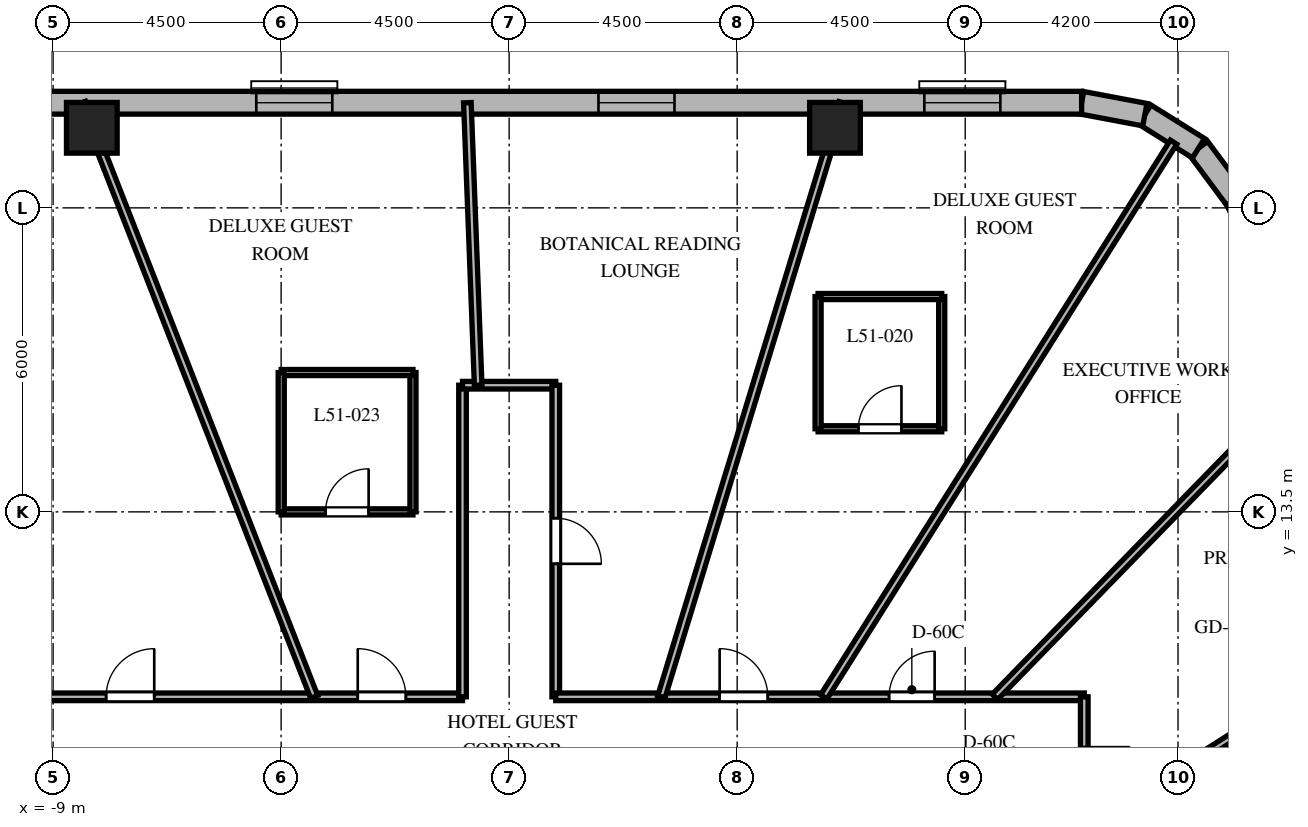
"""IFC4 building model, lengths in metres.
Left out: names, types, materials, properties, quantities, classifications, styles, units other than length and angle.
Written with IfcOpenShell. Run it as: python <this file> out.ifc"""

import sys

from ifc_helpers import new_model, si_unit, direction, frame, frame_2d, origin, origin_2d, place, context, subcontext, project, spatial, rectangle, extrude, element, fill, save


model = new_model("IFC4")
c1 = context("Model", 3, precision=1e-05, world=origin(), true_north=direction((0.0, 1.0)))
c2 = subcontext(c1, "Body", "Model", "MODEL_VIEW")
j1 = project(units=[si_unit("LENGTHUNIT", "METRE"), si_unit("PLANEANGLEUNIT", "RADIAN")], contexts=[c1])
p1 = place(None, origin())
s1 = spatial("IfcSite", under=j1, at=p1, CompositionType="ELEMENT")
p2 = place(p1, origin())
s2 = spatial("IfcBuilding", under=s1, at=p2, CompositionType="ELEMENT")
p3 = place(p2, frame((0.0, 0.0, 206.5)))
s3 = spatial("IfcBuildingStorey", under=s2, at=p3, CompositionType="ELEMENT", Elevation=206.5)
for number, where, z_axis, x_axis in (
    (1, (6.43, 21.08, 0.0), (0.0, 0.0, 1.0), (1.0, 0.0, 0.0)),
    (2, (-8.236, 21.08, 0.0), (0.0, 0.0, 1.0), (1.0, 0.0, 0.0)),
):
    element("IfcColumn", number, at=place(p3, frame(where, z_axis=z_axis, x_axis=x_axis)), inside=s3, PredefinedType="COLUMN", context=c2, shape_type="SweptSolid", body=[
        extrude(rectangle(XDim=1.0, YDim=1.0, at=origin_2d()), origin(), (0.0, 0.0, 1.0), 3.8),
    ])
p4 = place(p3, frame((14.362, 19.658, 0.0), z_axis=(0.0, 0.0, 1.0), x_axis=(-0.596642462792, 0.80250717853, 0.0)))
e3 = element("IfcWall", 3, at=p4, inside=s3, PredefinedType="SOLIDWALL", context=c2, shape_type="SweptSolid", body=[
    extrude(rectangle(XDim=1.27, YDim=0.45, at=frame_2d((0.635, 0.0))), origin(), (0.0, 0.0, 1.0), 3.5),
])
p5 = place(p3, frame((13.604, 20.678, 0.0), z_axis=(0.0, 0.0, 1.0), x_axis=(-0.847910404124, 0.53013955387, 0.0)))
e4 = element("IfcWall", 4, at=p5, inside=s3, PredefinedType="SOLIDWALL", context=c2, shape_type="SweptSolid", body=[
    extrude(rectangle(XDim=1.249, YDim=0.45, at=frame_2d((0.624, 0.0))), origin(), (0.0, 0.0, 1.0), 3.5),
])
p6 = place(p3, frame((12.546, 21.34, 0.0), z_axis=(0.0, 0.0, 1.0), x_axis=(-0.982686750835, 0.18527479519, 0.0)))
e5 = element("IfcWall", 5, at=p6, inside=s3, PredefinedType="SOLIDWALL", context=c2, shape_type="SweptSolid", body=[
    extrude(rectangle(XDim=1.27, YDim=0.45, at=frame_2d((0.635, 0.0))), origin(), (0.0, 0.0, 1.0), 3.5),
])
p7 = place(p3, frame((22.74, 2.452, 0.0), z_axis=(0.0, 0.0, 1.0), x_axis=(-0.437753424814, 0.899095066755, 0.0)))
e6 = element("IfcWall", 6, at=p7, inside=s3, PredefinedType="SOLIDWALL", context=c2, shape_type="SweptSolid", body=[
    extrude(rectangle(XDim=19.137, YDim=0.45, at=frame_2d((9.569, 0.0))), origin(), (0.0, 0.0, 1.0), 3.5),
])
p8 = place(p7, frame((4.763, 0.0, 0.0)))
e7 = element("IfcOpeningElement", 7, at=p8, cuts=e6, PredefinedType="OPENING", context=c2, shape_type="SweptSolid", body=[
    extrude(rectangle(XDim=1.0, YDim=2.15, at=frame_2d((0.5, 1.075))), frame((0.0, 0.235, 0.0), z_axis=(0.0, -1.0, 0.0), x_axis=(1.0, 0.0, 0.0)), (0.0, 0.0, 1.0), 0.47),
])
p9 = place(p7, frame((0.916, 0.0, 0.8)))
e8 = element("IfcOpeningElement", 8, at=p9, cuts=e6, PredefinedType="OPENING", context=c2, shape_type="SweptSolid", body=[
    extrude(rectangle(XDim=2.1, YDim=1.85, at=frame_2d((1.05, 0.925))), frame((0.0, 0.235, 0.0), z_axis=(0.0, -1.0, 0.0), x_axis=(1.0, 0.0, 0.0)), (0.0, 0.0, 1.0), 0.47),
])
p10 = place(p7, frame((6.851, 0.0, 0.8)))
e9 = element("IfcOpeningElement", 9, at=p10, cuts=e6, PredefinedType="OPENING", context=c2, shape_type="SweptSolid", body=[
    extrude(rectangle(XDim=2.1, YDim=1.85, at=frame_2d((1.05, 0.925))), frame((0.0, 0.235, 0.0), z_axis=(0.0, -1.0, 0.0), x_axis=(1.0, 0.0, 0.0)), (0.0, 0.0, 1.0), 0.47),
])
p11 = place(p7, frame((11.545, 0.0, 0.8)))
e10 = element("IfcOpeningElement", 10, at=p11, cuts=e6, PredefinedType="OPENING", context=c2, shape_type="SweptSolid", body=[
    extrude(rectangle(XDim=2.1, YDim=1.85, at=frame_2d((1.05, 0.925))), frame((0.0, 0.235, 0.0), z_axis=(0.0, -1.0, 0.0), x_axis=(1.0, 0.0, 0.0)), (0.0, 0.0, 1.0), 0.47),
])
p12 = place(p7, frame((16.173, 0.0, 0.8)))
e11 = element("IfcOpeningElement", 11, at=p12, cuts=e6, PredefinedType="OPENING", context=c2, shape_type="SweptSolid", body=[
    extrude(rectangle(XDim=2.1, YDim=1.85, at=frame_2d((1.05, 0.925))), frame((0.0, 0.235, 0.0), z_axis=(0.0, -1.0, 0.0), x_axis=(1.0, 0.0, 0.0)), (0.0, 0.0, 1.0), 0.47),
])
p13 = place(p3, frame((11.298, 21.575, 0.0), z_axis=(0.0, 0.0, 1.0), x_axis=(-1.0, 0.0, 0.0)))
e12 = element("IfcWall", 12, at=p13, inside=s3, PredefinedType="SOLIDWALL", context=c2, shape_type="SweptSolid", body=[
    extrude(rectangle(XDim=24.399, YDim=0.45, at=frame_2d((12.2, 0.0))), origin(), (0.0, 0.0, 1.0), 3.5),
])
p14 = place(p13, frame((1.604, 0.0, 0.8)))
e13 = element("IfcOpeningElement", 13, at=p14, cuts=e12, PredefinedType="OPENING", context=c2, shape_type="SweptSolid", body=[
    extrude(rectangle(XDim=1.5, YDim=1.8, at=frame_2d((0.75, 0.9))), frame((0.0, 0.235, 0.0), z_axis=(0.0, -1.0, 0.0), x_axis=(1.0, 0.0, 0.0)), (0.0, 0.0, 1.0), 0.47),
])
p15 = place(p13, frame((8.035, 0.0, 0.8)))
e14 = element("IfcOpeningElement", 14, at=p15, cuts=e12, PredefinedType="OPENING", context=c2, shape_type="SweptSolid", body=[
    extrude(rectangle(XDim=1.5, YDim=1.8, at=frame_2d((0.75, 0.9))), frame((0.0, 0.235, 0.0), z_axis=(0.0, -1.0, 0.0), x_axis=(1.0, 0.0, 0.0)), (0.0, 0.0, 1.0), 0.47),
])
p16 = place(p13, frame((14.788, 0.0, 0.8)))
e15 = element("IfcOpeningElement", 15, at=p16, cuts=e12, PredefinedType="OPENING", context=c2, shape_type="SweptSolid", body=[
    extrude(rectangle(XDim=1.5, YDim=1.8, at=frame_2d((0.75, 0.9))), frame((0.0, 0.235, 0.0), z_axis=(0.0, -1.0, 0.0), x_axis=(1.0, 0.0, 0.0)), (0.0, 0.0, 1.0), 0.47),
])
p17 = place(p13, frame((21.296, 0.0, 0.8)))
e16 = element("IfcOpeningElement", 16, at=p17, cuts=e12, PredefinedType="OPENING", context=c2, shape_type="SweptSolid", body=[
    extrude(rectangle(XDim=1.5, YDim=1.8, at=frame_2d((0.75, 0.9))), frame((0.0, 0.235, 0.0), z_axis=(0.0, -1.0, 0.0), x_axis=(1.0, 0.0, 0.0)), (0.0, 0.0, 1.0), 0.47),
])
p18 = place(p3, frame((-11.35, 9.85, 0.0), z_axis=(0.0, 0.0, 1.0), x_axis=(1.0, 0.0, 0.0)))
e17 = element("IfcWall", 17, at=p18, inside=s3, PredefinedType="PARTITIONING", context=c2, shape_type="SweptSolid", body=[
    extrude(rectangle(XDim=10.43, YDim=0.15, at=frame_2d((5.215, 0.0))), origin(), (0.0, 0.0, 1.0), 2.99),
])
p19 = place(p18, frame((8.362, 0.0, 0.0)))
e18 = element("IfcOpeningElement", 18, at=p19, cuts=e17, PredefinedType="OPENING", context=c2, shape_type="SweptSolid", body=[
    extrude(rectangle(XDim=0.95, YDim=2.03, at=frame_2d((0.475, 1.015))), frame((0.0, 0.085, 0.0), z_axis=(0.0, -1.0, 0.0), x_axis=(1.0, 0.0, 0.0)), (0.0, 0.0, 1.0), 0.17),
])
p20 = place(p18, frame((3.396, 0.0, 0.0)))
e19 = element("IfcOpeningElement", 19, at=p20, cuts=e17, PredefinedType="OPENING", context=c2, shape_type="SweptSolid", body=[
    extrude(rectangle(XDim=0.95, YDim=2.03, at=frame_2d((0.475, 1.015))), frame((0.0, 0.085, 0.0), z_axis=(0.0, -1.0, 0.0), x_axis=(1.0, 0.0, 0.0)), (0.0, 0.0, 1.0), 0.17),
])
p21 = place(p3, frame((-0.92, 9.85, 0.0), z_axis=(0.0, 0.0, 1.0), x_axis=(0.0, 1.0, 0.0)))
e20 = element("IfcWall", 20, at=p21, inside=s3, PredefinedType="PARTITIONING", context=c2, shape_type="SweptSolid", body=[
    extrude(rectangle(XDim=6.15, YDim=0.15, at=frame_2d((3.075, 0.0))), origin(), (0.0, 0.0, 1.0), 3.027),
])
p22 = place(p3, frame((-0.92, 16.0, 0.0), z_axis=(0.0, 0.0, 1.0), x_axis=(1.0, 0.0, 0.0)))
e21 = element("IfcWall", 21, at=p22, inside=s3, PredefinedType="PARTITIONING", context=c2, shape_type="SweptSolid", body=[
    extrude(rectangle(XDim=1.84, YDim=0.15, at=frame_2d((0.92, 0.0))), origin(), (0.0, 0.0, 1.0), 3.5),
])
p23 = place(p3, frame((0.92, 16.0, 0.0), z_axis=(0.0, 0.0, 1.0), x_axis=(0.0, -1.0, 0.0)))
e22 = element("IfcWall", 22, at=p23, inside=s3, PredefinedType="PARTITIONING", context=c2, shape_type="SweptSolid", body=[
    extrude(rectangle(XDim=6.15, YDim=0.15, at=frame_2d((3.075, 0.0))), origin(), (0.0, 0.0, 1.0), 3.027),
])
p24 = place(p23, frame((2.625, 0.0, 0.0)))
e23 = element("IfcOpeningElement", 23, at=p24, cuts=e22, PredefinedType="OPENING", context=c2, shape_type="SweptSolid", body=[
    extrude(rectangle(XDim=0.9, YDim=2.03, at=frame_2d((0.45, 1.015))), frame((0.0, 0.085, 0.0), z_axis=(0.0, -1.0, 0.0), x_axis=(1.0, 0.0, 0.0)), (0.0, 0.0, 1.0), 0.17),
])
p25 = place(p3, frame((0.92, 9.85, 0.0), z_axis=(0.0, 0.0, 1.0), x_axis=(1.0, 0.0, 0.0)))
e24 = element("IfcWall", 24, at=p25, inside=s3, PredefinedType="PARTITIONING", context=c2, shape_type="SweptSolid", body=[
    extrude(rectangle(XDim=10.43, YDim=0.15, at=frame_2d((5.215, 0.0))), origin(), (0.0, 0.0, 1.0), 2.99),
])
p26 = place(p25, frame((6.577, 0.0, 0.0)))
e25 = element("IfcOpeningElement", 25, at=p26, cuts=e24, PredefinedType="OPENING", context=c2, shape_type="SweptSolid", body=[
    extrude(rectangle(XDim=0.9, YDim=2.03, at=frame_2d((0.45, 1.015))), frame((0.0, 0.085, 0.0), z_axis=(0.0, -1.0, 0.0), x_axis=(1.0, 0.0, 0.0)), (0.0, 0.0, 1.0), 0.17),
])
p27 = place(p25, frame((3.234, 0.0, 0.0)))
e26 = element("IfcOpeningElement", 26, at=p27, cuts=e24, PredefinedType="OPENING", context=c2, shape_type="SweptSolid", body=[
    extrude(rectangle(XDim=0.95, YDim=2.03, at=frame_2d((0.475, 1.015))), frame((0.0, 0.085, 0.0), z_axis=(0.0, -1.0, 0.0), x_axis=(1.0, 0.0, 0.0)), (0.0, 0.0, 1.0), 0.17),
])
p28 = place(p3, frame((11.35, 9.85, 0.0), z_axis=(0.0, 0.0, 1.0), x_axis=(0.0, -1.0, 0.0)))
e27 = element("IfcWall", 27, at=p28, inside=s3, PredefinedType="PARTITIONING", context=c2, shape_type="SweptSolid", body=[
    extrude(rectangle(XDim=12.4, YDim=0.15, at=frame_2d((6.2, 0.0))), origin(), (0.0, 0.0, 1.0), 2.99),
])
p29 = place(p28, frame((7.555, 0.0, 0.0)))
e28 = element("IfcOpeningElement", 28, at=p29, cuts=e27, PredefinedType="OPENING", context=c2, shape_type="SweptSolid", body=[
    extrude(rectangle(XDim=0.95, YDim=2.03, at=frame_2d((0.475, 1.015))), frame((0.0, 0.085, 0.0), z_axis=(0.0, -1.0, 0.0), x_axis=(1.0, 0.0, 0.0)), (0.0, 0.0, 1.0), 0.17),
])
p30 = place(p28, frame((4.191, 0.0, 0.0)))
e29 = element("IfcOpeningElement", 29, at=p30, cuts=e27, PredefinedType="OPENING", context=c2, shape_type="SweptSolid", body=[
    extrude(rectangle(XDim=0.95, YDim=2.03, at=frame_2d((0.475, 1.015))), frame((0.0, 0.085, 0.0), z_axis=(0.0, -1.0, 0.0), x_axis=(1.0, 0.0, 0.0)), (0.0, 0.0, 1.0), 0.17),
])
p31 = place(p28, frame((0.994, 0.0, 0.0)))
e30 = element("IfcOpeningElement", 30, at=p31, cuts=e27, PredefinedType="OPENING", context=c2, shape_type="SweptSolid", body=[
    extrude(rectangle(XDim=0.9, YDim=2.03, at=frame_2d((0.45, 1.015))), frame((0.0, 0.085, 0.0), z_axis=(0.0, -1.0, 0.0), x_axis=(1.0, 0.0, 0.0)), (0.0, 0.0, 1.0), 0.17),
])
p32 = place(p28, frame((10.144, 0.0, 0.0)))
e31 = element("IfcOpeningElement", 31, at=p32, cuts=e27, PredefinedType="OPENING", context=c2, shape_type="SweptSolid", body=[
    extrude(rectangle(XDim=0.95, YDim=2.03, at=frame_2d((0.475, 1.015))), frame((0.0, 0.085, 0.0), z_axis=(0.0, -1.0, 0.0), x_axis=(1.0, 0.0, 0.0)), (0.0, 0.0, 1.0), 0.17),
])
p33 = place(p3, frame((11.35, 7.202, 0.0), z_axis=(0.0, 0.0, 1.0), x_axis=(0.844364592263, 0.535769013039, 0.0)))
e32 = element("IfcWall", 32, at=p33, inside=s3, PredefinedType="PARTITIONING", context=c2, shape_type="SweptSolid", body=[
    extrude(rectangle(XDim=8.213, YDim=0.15, at=frame_2d((4.106, 0.0))), origin(), (0.0, 0.0, 1.0), 2.74),
])
p34 = place(p3, frame((9.588, 9.85, 0.0), z_axis=(0.0, 0.0, 1.0), x_axis=(0.697519469595, 0.716565830567, 0.0)))
e33 = element("IfcWall", 33, at=p34, inside=s3, PredefinedType="PARTITIONING", context=c2, shape_type="SweptSolid", body=[
    extrude(rectangle(XDim=9.126, YDim=0.15, at=frame_2d((4.563, 0.0))), origin(), (0.0, 0.0, 1.0), 2.74),
])
p35 = place(p3, frame((6.21, 9.85, 0.0), z_axis=(0.0, 0.0, 1.0), x_axis=(0.533335553786, 0.84590376939, 0.0)))
e34 = element("IfcWall", 34, at=p35, inside=s3, PredefinedType="PARTITIONING", context=c2, shape_type="SweptSolid", body=[
    extrude(rectangle(XDim=12.941, YDim=0.15, at=frame_2d((6.47, 0.0))), origin(), (0.0, 0.0, 1.0), 2.74),
])
p36 = place(p3, frame((3.004, 9.85, 0.0), z_axis=(0.0, 0.0, 1.0), x_axis=(0.291775760688, 0.956486751333, 0.0)))
e35 = element("IfcWall", 35, at=p36, inside=s3, PredefinedType="PARTITIONING", context=c2, shape_type="SweptSolid", body=[
    extrude(rectangle(XDim=12.258, YDim=0.15, at=frame_2d((6.129, 0.0))), origin(), (0.0, 0.0, 1.0), 2.74),
])
p37 = place(p3, frame((-0.612, 16.0, 0.0), z_axis=(0.0, 0.0, 1.0), x_axis=(-0.038202877739, 0.999270003619, 0.0)))
e36 = element("IfcWall", 36, at=p37, inside=s3, PredefinedType="PARTITIONING", context=c2, shape_type="SweptSolid", body=[
    extrude(rectangle(XDim=5.579, YDim=0.15, at=frame_2d((2.79, 0.0))), origin(), (0.0, 0.0, 1.0), 2.74),
])
p38 = place(p3, frame((-3.848, 9.85, 0.0), z_axis=(0.0, 0.0, 1.0), x_axis=(-0.363921778212, 0.931429513889, 0.0)))
e37 = element("IfcWall", 37, at=p38, inside=s3, PredefinedType="PARTITIONING", context=c2, shape_type="SweptSolid", body=[
    extrude(rectangle(XDim=12.588, YDim=0.15, at=frame_2d((6.294, 0.0))), origin(), (0.0, 0.0, 1.0), 2.74),
])
p39 = place(p3, frame((6.097, 15.14, 0.0), z_axis=(0.0, 0.0, 1.0), x_axis=(1.0, 0.0, 0.0)))
e38 = element("IfcWall", 38, at=p39, inside=s3, PredefinedType="PARTITIONING", context=c2, shape_type="SweptSolid", body=[
    extrude(rectangle(XDim=2.44, YDim=0.12, at=frame_2d((1.22, 0.0))), origin(), (0.0, 0.0, 1.0), 3.5),
])
p40 = place(p39, frame((0.795, 0.0, 0.0)))
e39 = element("IfcOpeningElement", 39, at=p40, cuts=e38, PredefinedType="OPENING", context=c2, shape_type="SweptSolid", body=[
    extrude(rectangle(XDim=0.85, YDim=2.03, at=frame_2d((0.425, 1.015))), frame((0.0, 0.07, 0.0), z_axis=(0.0, -1.0, 0.0), x_axis=(1.0, 0.0, 0.0)), (0.0, 0.0, 1.0), 0.14),
])
p41 = place(p3, frame((8.537, 15.14, 0.0), z_axis=(0.0, 0.0, 1.0), x_axis=(0.0, 1.0, 0.0)))
e40 = element("IfcWall", 40, at=p41, inside=s3, PredefinedType="PARTITIONING", context=c2, shape_type="SweptSolid", body=[
    extrude(rectangle(XDim=2.61, YDim=0.12, at=frame_2d((1.305, 0.0))), origin(), (0.0, 0.0, 1.0), 3.073),
])
p42 = place(p3, frame((8.537, 17.75, 0.0), z_axis=(0.0, 0.0, 1.0), x_axis=(-1.0, 0.0, 0.0)))
e41 = element("IfcWall", 41, at=p42, inside=s3, PredefinedType="PARTITIONING", context=c2, shape_type="SweptSolid", body=[
    extrude(rectangle(XDim=2.44, YDim=0.12, at=frame_2d((1.22, 0.0))), origin(), (0.0, 0.0, 1.0), 3.5),
])
p43 = place(p3, frame((6.097, 17.75, 0.0), z_axis=(0.0, 0.0, 1.0), x_axis=(0.0, -1.0, 0.0)))
e42 = element("IfcWall", 42, at=p43, inside=s3, PredefinedType="PARTITIONING", context=c2, shape_type="SweptSolid", body=[
    extrude(rectangle(XDim=2.61, YDim=0.12, at=frame_2d((1.305, 0.0))), origin(), (0.0, 0.0, 1.0), 2.99),
])
p44 = place(p3, frame((-4.498, 13.5, 0.0), z_axis=(0.0, 0.0, 1.0), x_axis=(1.0, 0.0, 0.0)))
e43 = element("IfcWall", 43, at=p44, inside=s3, PredefinedType="PARTITIONING", context=c2, shape_type="SweptSolid", body=[
    extrude(rectangle(XDim=2.6, YDim=0.12, at=frame_2d((1.3, 0.0))), origin(), (0.0, 0.0, 1.0), 3.027),
])
p45 = place(p44, frame((0.875, 0.0, 0.0)))
e44 = element("IfcOpeningElement", 44, at=p45, cuts=e43, PredefinedType="OPENING", context=c2, shape_type="SweptSolid", body=[
    extrude(rectangle(XDim=0.85, YDim=2.03, at=frame_2d((0.425, 1.015))), frame((0.0, 0.07, 0.0), z_axis=(0.0, -1.0, 0.0), x_axis=(1.0, 0.0, 0.0)), (0.0, 0.0, 1.0), 0.14),
])
p46 = place(p3, frame((-1.898, 13.5, 0.0), z_axis=(0.0, 0.0, 1.0), x_axis=(0.0, 1.0, 0.0)))
e45 = element("IfcWall", 45, at=p46, inside=s3, PredefinedType="PARTITIONING", context=c2, shape_type="SweptSolid", body=[
    extrude(rectangle(XDim=2.75, YDim=0.12, at=frame_2d((1.375, 0.0))), origin(), (0.0, 0.0, 1.0), 3.027),
])
p47 = place(p3, frame((-1.898, 16.25, 0.0), z_axis=(0.0, 0.0, 1.0), x_axis=(-1.0, 0.0, 0.0)))
e46 = element("IfcWall", 46, at=p47, inside=s3, PredefinedType="PARTITIONING", context=c2, shape_type="SweptSolid", body=[
    extrude(rectangle(XDim=2.6, YDim=0.12, at=frame_2d((1.3, 0.0))), origin(), (0.0, 0.0, 1.0), 3.5),
])
p48 = place(p3, frame((-4.498, 16.25, 0.0), z_axis=(0.0, 0.0, 1.0), x_axis=(0.0, -1.0, 0.0)))
e47 = element("IfcWall", 47, at=p48, inside=s3, PredefinedType="PARTITIONING", context=c2, shape_type="SweptSolid", body=[
    extrude(rectangle(XDim=2.75, YDim=0.12, at=frame_2d((1.375, 0.0))), origin(), (0.0, 0.0, 1.0), 3.027),
])
p49 = place(p14, origin())
e48 = element("IfcWindow", 48, at=p49, inside=s3, PartitioningType="SINGLE_PANEL", PredefinedType="WINDOW", context=c2, shape_type="SweptSolid", body=[
    extrude(rectangle(XDim=1.5, YDim=1.8, at=frame_2d((0.75, 0.9))), frame((0.0, 0.03, 0.0), z_axis=(0.0, -1.0, 0.0), x_axis=(1.0, 0.0, 0.0)), (0.0, 0.0, 1.0), 0.06),
])
fill(e13, e48)
p50 = place(p15, origin())
e49 = element("IfcWindow", 49, at=p50, inside=s3, PartitioningType="SINGLE_PANEL", PredefinedType="WINDOW", context=c2, shape_type="SweptSolid", body=[
    extrude(rectangle(XDim=1.5, YDim=1.8, at=frame_2d((0.75, 0.9))), frame((0.0, 0.03, 0.0), z_axis=(0.0, -1.0, 0.0), x_axis=(1.0, 0.0, 0.0)), (0.0, 0.0, 1.0), 0.06),
])
fill(e14, e49)
p51 = place(p16, origin())
e50 = element("IfcWindow", 50, at=p51, inside=s3, PartitioningType="SINGLE_PANEL", PredefinedType="WINDOW", context=c2, shape_type="SweptSolid", body=[
    extrude(rectangle(XDim=1.5, YDim=1.8, at=frame_2d((0.75, 0.9))), frame((0.0, 0.03, 0.0), z_axis=(0.0, -1.0, 0.0), x_axis=(1.0, 0.0, 0.0)), (0.0, 0.0, 1.0), 0.06),
])
fill(e15, e50)
p52 = place(p31, origin())
e51 = element("IfcDoor", 51, at=p52, inside=s3, OperationType="SINGLE_SWING_LEFT", PredefinedType="DOOR", context=c2, shape_type="SweptSolid", body=[
    extrude(rectangle(XDim=0.9, YDim=2.03, at=frame_2d((0.45, 1.015))), frame((0.0, 0.025, 0.0), z_axis=(0.0, -1.0, 0.0), x_axis=(1.0, 0.0, 0.0)), (0.0, 0.0, 1.0), 0.05),
])
fill(e30, e51)
p53 = place(p26, origin())
e52 = element("IfcDoor", 52, at=p53, inside=s3, OperationType="SINGLE_SWING_RIGHT", PredefinedType="DOOR", context=c2, shape_type="SweptSolid", body=[
    extrude(rectangle(XDim=0.9, YDim=2.03, at=frame_2d((0.45, 1.015))), frame((0.0, 0.025, 0.0), z_axis=(0.0, -1.0, 0.0), x_axis=(1.0, 0.0, 0.0)), (0.0, 0.0, 1.0), 0.05),
])
fill(e25, e52)
p54 = place(p27, origin())
e53 = element("IfcDoor", 53, at=p54, inside=s3, OperationType="SINGLE_SWING_LEFT", PredefinedType="DOOR", context=c2, shape_type="SweptSolid", body=[
    extrude(rectangle(XDim=0.95, YDim=2.03, at=frame_2d((0.475, 1.015))), frame((0.0, 0.025, 0.0), z_axis=(0.0, -1.0, 0.0), x_axis=(1.0, 0.0, 0.0)), (0.0, 0.0, 1.0), 0.05),
])
fill(e26, e53)
p55 = place(p40, origin())
e54 = element("IfcDoor", 54, at=p55, inside=s3, OperationType="SINGLE_SWING_RIGHT", PredefinedType="DOOR", context=c2, shape_type="SweptSolid", body=[
    extrude(rectangle(XDim=0.85, YDim=2.03, at=frame_2d((0.425, 1.015))), frame((0.0, 0.025, 0.0), z_axis=(0.0, -1.0, 0.0), x_axis=(1.0, 0.0, 0.0)), (0.0, 0.0, 1.0), 0.05),
])
fill(e39, e54)
p56 = place(p24, origin())
e55 = element("IfcDoor", 55, at=p56, inside=s3, OperationType="SINGLE_SWING_RIGHT", PredefinedType="DOOR", context=c2, shape_type="SweptSolid", body=[
    extrude(rectangle(XDim=0.9, YDim=2.03, at=frame_2d((0.45, 1.015))), frame((0.0, 0.025, 0.0), z_axis=(0.0, -1.0, 0.0), x_axis=(1.0, 0.0, 0.0)), (0.0, 0.0, 1.0), 0.05),
])
fill(e23, e55)
p57 = place(p19, origin())
e56 = element("IfcDoor", 56, at=p57, inside=s3, OperationType="SINGLE_SWING_LEFT", PredefinedType="DOOR", context=c2, shape_type="SweptSolid", body=[
    extrude(rectangle(XDim=0.95, YDim=2.03, at=frame_2d((0.475, 1.015))), frame((0.0, 0.025, 0.0), z_axis=(0.0, -1.0, 0.0), x_axis=(1.0, 0.0, 0.0)), (0.0, 0.0, 1.0), 0.05),
])
fill(e18, e56)
p58 = place(p45, origin())
e57 = element("IfcDoor", 57, at=p58, inside=s3, OperationType="SINGLE_SWING_RIGHT", PredefinedType="DOOR", context=c2, shape_type="SweptSolid", body=[
    extrude(rectangle(XDim=0.85, YDim=2.03, at=frame_2d((0.425, 1.015))), frame((0.0, 0.025, 0.0), z_axis=(0.0, -1.0, 0.0), x_axis=(1.0, 0.0, 0.0)), (0.0, 0.0, 1.0), 0.05),
])
fill(e44, e57)
p59 = place(p20, origin())
e58 = element("IfcDoor", 58, at=p59, inside=s3, OperationType="SINGLE_SWING_RIGHT", PredefinedType="DOOR", context=c2, shape_type="SweptSolid", body=[
    extrude(rectangle(XDim=0.95, YDim=2.03, at=frame_2d((0.475, 1.015))), frame((0.0, 0.025, 0.0), z_axis=(0.0, -1.0, 0.0), x_axis=(1.0, 0.0, 0.0)), (0.0, 0.0, 1.0), 0.05),
])
fill(e19, e58)
save(model, sys.argv[1])
